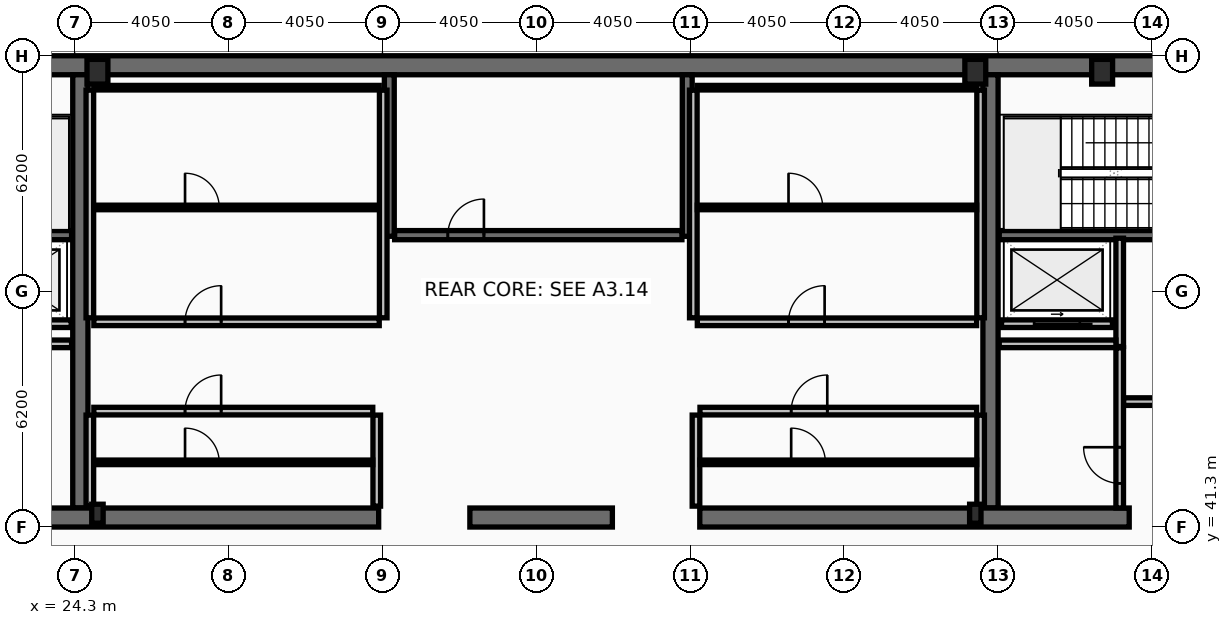
"""IFC4 building model, lengths in metres.
Left out: names, types, materials, properties, quantities, classifications, styles, units other than length and angle.
Written with IfcOpenShell. Run it as: python <this file> out.ifc"""

import sys

from ifc_helpers import new_model, si_unit, direction, frame, frame_2d, origin, origin_2d, place, context, subcontext, project, spatial, rectangle, hollow_rectangle, i_section, extrude, element, fill, save


model = new_model("IFC4")
c1 = context("Model", 3, precision=1e-05, world=origin(), true_north=direction((0.0, 1.0)))
c2 = subcontext(c1, "Body", "Model", "MODEL_VIEW")
j1 = project(units=[si_unit("LENGTHUNIT", "METRE"), si_unit("PLANEANGLEUNIT", "RADIAN")], contexts=[c1])
p1 = place(None, origin())
s1 = spatial("IfcSite", under=j1, at=p1, CompositionType="ELEMENT")
p2 = place(p1, origin())
s2 = spatial("IfcBuilding", under=s1, at=p2, CompositionType="ELEMENT")
p3 = place(p2, frame((0.0, 0.0, 373.0)))
s3 = spatial("IfcBuildingStorey", under=s2, at=p3, CompositionType="ELEMENT", Elevation=373.0)
p4 = place(p3, frame((16.2, 53.45, 0.0), z_axis=(0.0, 0.0, 1.0), x_axis=(1.0, 0.0, 0.0)))
e1 = element("IfcWall", 1, at=p4, inside=s3, PredefinedType="SHEAR", context=c2, shape_type="SweptSolid", body=[
    extrude(rectangle(XDim=40.5, YDim=0.5, at=frame_2d((20.25, 0.0))), origin(), (0.0, 0.0, 1.0), 5.4),
])
for number, where, z_axis, x_axis in (
    (2, (24.45, 41.8, 0.0), (0.0, 0.0, 1.0), (0.0, 1.0, 0.0)),
    (3, (48.4, 41.8, 0.0), (0.0, 0.0, 1.0), (0.0, 1.0, 0.0)),
):
    element("IfcWall", number, at=place(p3, frame(where, z_axis=z_axis, x_axis=x_axis)), inside=s3, PredefinedType="SHEAR", context=c2, shape_type="SweptSolid", body=[
        extrude(rectangle(XDim=11.4, YDim=0.4, at=frame_2d((5.7, 0.0))), origin(), (0.0, 0.0, 1.0), 5.4),
    ])
p5 = place(p3, frame((32.3, 41.55, 0.0), z_axis=(0.0, 0.0, 1.0), x_axis=(-1.0, 0.0, 0.0)))
e4 = element("IfcWall", 4, at=p5, inside=s3, PredefinedType="SHEAR", context=c2, shape_type="SweptSolid", body=[
    extrude(rectangle(XDim=11.45, YDim=0.5, at=frame_2d((5.725, 0.0))), origin(), (0.0, 0.0, 1.0), 5.4),
])
p6 = place(p3, frame((38.45, 41.55, 0.0), z_axis=(0.0, 0.0, 1.0), x_axis=(-1.0, 0.0, 0.0)))
e5 = element("IfcWall", 5, at=p6, inside=s3, PredefinedType="SHEAR", context=c2, shape_type="SweptSolid", body=[
    extrude(rectangle(XDim=3.75, YDim=0.5, at=frame_2d((1.875, 0.0))), origin(), (0.0, 0.0, 1.0), 5.4),
])
p7 = place(p3, frame((52.05, 41.55, 0.0), z_axis=(0.0, 0.0, 1.0), x_axis=(-1.0, 0.0, 0.0)))
e6 = element("IfcWall", 6, at=p7, inside=s3, PredefinedType="SHEAR", context=c2, shape_type="SweptSolid", body=[
    extrude(rectangle(XDim=11.3, YDim=0.5, at=frame_2d((5.65, 0.0))), origin(), (0.0, 0.0, 1.0), 5.4),
])
for number, where, z_axis, x_axis in (
    (7, (32.58, 48.95, 0.0), (0.0, 0.0, 1.0), (0.0, 1.0, 0.0)),
    (8, (40.42, 48.95, 0.0), (0.0, 0.0, 1.0), (0.0, 1.0, 0.0)),
):
    element("IfcWall", number, at=place(p3, frame(where, z_axis=z_axis, x_axis=x_axis)), inside=s3, PredefinedType="SHEAR", context=c2, shape_type="SweptSolid", body=[
        extrude(rectangle(XDim=4.25, YDim=0.26, at=frame_2d((2.125, 0.0))), origin(), (0.0, 0.0, 1.0), 5.4),
    ])
p8 = place(p3, frame((16.7, 48.98, 0.0), z_axis=(0.0, 0.0, 1.0), x_axis=(1.0, 0.0, 0.0)))
e9 = element("IfcWall", 9, at=p8, inside=s3, PredefinedType="SHEAR", context=c2, shape_type="SweptSolid", body=[
    extrude(rectangle(XDim=7.52, YDim=0.24, at=frame_2d((3.76, 0.0))), origin(), (0.0, 0.0, 1.0), 5.4),
])
p9 = place(p8, frame((0.22, 0.0, 0.0)))
e10 = element("IfcOpeningElement", 10, at=p9, cuts=e9, PredefinedType="OPENING", context=c2, shape_type="SweptSolid", body=[
    extrude(rectangle(XDim=1.05, YDim=2.15, at=frame_2d((0.525, 1.075))), frame((0.0, 0.13, 0.0), z_axis=(0.0, -1.0, 0.0), x_axis=(1.0, 0.0, 0.0)), (0.0, 0.0, 1.0), 0.26),
])
p10 = place(p3, frame((48.63, 48.98, 0.0), z_axis=(0.0, 0.0, 1.0), x_axis=(1.0, 0.0, 0.0)))
e11 = element("IfcWall", 11, at=p10, inside=s3, PredefinedType="SHEAR", context=c2, shape_type="SweptSolid", body=[
    extrude(rectangle(XDim=7.57, YDim=0.24, at=frame_2d((3.785, 0.0))), origin(), (0.0, 0.0, 1.0), 5.4),
])
p11 = place(p10, frame((6.3, 0.0, 0.0)))
e12 = element("IfcOpeningElement", 12, at=p11, cuts=e11, PredefinedType="OPENING", context=c2, shape_type="SweptSolid", body=[
    extrude(rectangle(XDim=1.05, YDim=2.15, at=frame_2d((0.525, 1.075))), frame((0.0, 0.13, 0.0), z_axis=(0.0, -1.0, 0.0), x_axis=(1.0, 0.0, 0.0)), (0.0, 0.0, 1.0), 0.26),
])
p12 = place(p3, frame((32.72, 48.98, 0.0), z_axis=(0.0, 0.0, 1.0), x_axis=(1.0, 0.0, 0.0)))
e13 = element("IfcWall", 13, at=p12, inside=s3, PredefinedType="SHEAR", context=c2, shape_type="SweptSolid", body=[
    extrude(rectangle(XDim=7.56, YDim=0.24, at=frame_2d((3.78, 0.0))), origin(), (0.0, 0.0, 1.0), 5.4),
])
p13 = place(p12, frame((1.4, 0.0, 0.0)))
e14 = element("IfcOpeningElement", 14, at=p13, cuts=e13, PredefinedType="OPENING", context=c2, shape_type="SweptSolid", body=[
    extrude(rectangle(XDim=0.95, YDim=2.1, at=frame_2d((0.475, 1.05))), frame((0.0, 0.13, 0.0), z_axis=(0.0, -1.0, 0.0), x_axis=(1.0, 0.0, 0.0)), (0.0, 0.0, 1.0), 0.26),
])
for number, where, z_axis, x_axis in (
    (15, (24.9, 53.28, 0.0), (0.0, 0.0, 1.0), (1.0, 0.0, 0.0)),
    (16, (48.0, 53.28, 0.0), (0.0, 0.0, 1.0), (1.0, 0.0, 0.0)),
    (17, (51.337, 53.28, 0.0), (0.0, 0.0, 1.0), (1.0, 0.0, 0.0)),
):
    element("IfcColumn", number, at=place(p3, frame(where, z_axis=z_axis, x_axis=x_axis)), inside=s3, PredefinedType="COLUMN", context=c2, shape_type="SweptSolid", body=[
        extrude(hollow_rectangle(XDim=0.55, YDim=0.65, WallThickness=0.04, at=origin_2d()), origin(), (0.0, 0.0, 1.0), 5.6),
    ])
for number, where, z_axis, x_axis in (
    (18, (24.9, 41.65, 0.0), (0.0, 0.0, 1.0), (1.0, 0.0, 0.0)),
    (19, (48.0, 41.65, 0.0), (0.0, 0.0, 1.0), (1.0, 0.0, 0.0)),
):
    element("IfcColumn", number, at=place(p3, frame(where, z_axis=z_axis, x_axis=x_axis)), inside=s3, PredefinedType="COLUMN", context=c2, shape_type="SweptSolid", body=[
        extrude(i_section(OverallWidth=0.3, OverallDepth=0.5, WebThickness=0.014, FlangeThickness=0.028, at=origin_2d()), origin(), (0.0, 0.0, 1.0), 5.6),
    ])
p14 = place(p3, frame((51.61, 46.65, 0.0), z_axis=(0.0, 0.0, 1.0), x_axis=(-1.0, 0.0, 0.0)))
e20 = element("IfcWall", 20, at=p14, inside=s3, PredefinedType="PARTITIONING", context=c2, shape_type="SweptSolid", body=[
    extrude(rectangle(XDim=2.92, YDim=0.2, at=frame_2d((1.46, 0.0))), origin(), (0.0, 0.0, 1.0), 5.4),
])
p15 = place(p14, frame((0.86, 0.0, 0.0)))
e21 = element("IfcOpeningElement", 21, at=p15, cuts=e20, PredefinedType="OPENING", context=c2, shape_type="SweptSolid", body=[
    extrude(rectangle(XDim=1.2, YDim=2.18, at=frame_2d((0.6, 1.09))), frame((0.0, 0.11, 0.0), z_axis=(0.0, -1.0, 0.0), x_axis=(1.0, 0.0, 0.0)), (0.0, 0.0, 1.0), 0.22),
])
p16 = place(p3, frame((24.21, 46.65, 0.0), z_axis=(0.0, 0.0, 1.0), x_axis=(-1.0, 0.0, 0.0)))
e22 = element("IfcWall", 22, at=p16, inside=s3, PredefinedType="PARTITIONING", context=c2, shape_type="SweptSolid", body=[
    extrude(rectangle(XDim=2.97, YDim=0.2, at=frame_2d((1.485, 0.0))), origin(), (0.0, 0.0, 1.0), 5.4),
])
p17 = place(p16, frame((0.91, 0.0, 0.0)))
e23 = element("IfcOpeningElement", 23, at=p17, cuts=e22, PredefinedType="OPENING", context=c2, shape_type="SweptSolid", body=[
    extrude(rectangle(XDim=1.2, YDim=2.18, at=frame_2d((0.6, 1.09))), frame((0.0, 0.11, 0.0), z_axis=(0.0, -1.0, 0.0), x_axis=(1.0, 0.0, 0.0)), (0.0, 0.0, 1.0), 0.22),
])
p18 = place(p3, frame((21.2, 46.12, 0.0), z_axis=(0.0, 0.0, 1.0), x_axis=(1.0, 0.0, 0.0)))
e24 = element("IfcWall", 24, at=p18, inside=s3, PredefinedType="PARTITIONING", context=c2, shape_type="SweptSolid", body=[
    extrude(rectangle(XDim=3.02, YDim=0.2, at=frame_2d((1.51, 0.0))), origin(), (0.0, 0.0, 1.0), 5.4),
])
p19 = place(p3, frame((51.8, 46.05, 0.0), z_axis=(0.0, 0.0, 1.0), x_axis=(0.0, 1.0, 0.0)))
e25 = element("IfcWall", 25, at=p19, inside=s3, PredefinedType="PARTITIONING", context=c2, shape_type="SweptSolid", body=[
    extrude(rectangle(XDim=2.85, YDim=0.2, at=frame_2d((1.425, 0.0))), origin(), (0.0, 0.0, 1.0), 5.4),
])
p20 = place(p3, frame((51.9, 44.6, 0.0), z_axis=(0.0, 0.0, 1.0), x_axis=(1.0, 0.0, 0.0)))
e26 = element("IfcWall", 26, at=p20, inside=s3, PredefinedType="PARTITIONING", context=c2, shape_type="SweptSolid", body=[
    extrude(rectangle(XDim=4.3, YDim=0.2, at=frame_2d((2.15, 0.0))), origin(), (0.0, 0.0, 1.0), 5.4),
])
p21 = place(p20, frame((1.15, 0.0, 0.0)))
e27 = element("IfcOpeningElement", 27, at=p21, cuts=e26, PredefinedType="OPENING", context=c2, shape_type="SweptSolid", body=[
    extrude(rectangle(XDim=1.05, YDim=2.15, at=frame_2d((0.525, 1.075))), frame((0.0, 0.11, 0.0), z_axis=(0.0, -1.0, 0.0), x_axis=(1.0, 0.0, 0.0)), (0.0, 0.0, 1.0), 0.22),
])
p22 = place(p3, frame((48.63, 46.12, 0.0), z_axis=(0.0, 0.0, 1.0), x_axis=(1.0, 0.0, 0.0)))
e28 = element("IfcWall", 28, at=p22, inside=s3, PredefinedType="PARTITIONING", context=c2, shape_type="SweptSolid", body=[
    extrude(rectangle(XDim=3.07, YDim=0.2, at=frame_2d((1.535, 0.0))), origin(), (0.0, 0.0, 1.0), 5.4),
])
p23 = place(p3, frame((51.8, 41.8, 0.0), z_axis=(0.0, 0.0, 1.0), x_axis=(0.0, 1.0, 0.0)))
e29 = element("IfcWall", 29, at=p23, inside=s3, PredefinedType="PARTITIONING", context=c2, shape_type="SweptSolid", body=[
    extrude(rectangle(XDim=4.215, YDim=0.2, at=frame_2d((2.107, 0.0))), origin(), (0.0, 0.0, 1.0), 5.4),
])
p24 = place(p23, frame((0.65, 0.0, 0.0)))
e30 = element("IfcOpeningElement", 30, at=p24, cuts=e29, PredefinedType="OPENING", context=c2, shape_type="SweptSolid", body=[
    extrude(rectangle(XDim=0.95, YDim=2.1, at=frame_2d((0.475, 1.05))), frame((0.0, 0.11, 0.0), z_axis=(0.0, -1.0, 0.0), x_axis=(1.0, 0.0, 0.0)), (0.0, 0.0, 1.0), 0.22),
])
for number, where, z_axis, x_axis in (
    (31, (24.7, 46.805, 0.0), (0.0, 0.0, 1.0), (0.0, 1.0, 0.0)),
    (32, (32.42, 46.805, 0.0), (0.0, 0.0, 1.0), (0.0, 1.0, 0.0)),
):
    element("IfcWall", number, at=place(p3, frame(where, z_axis=z_axis, x_axis=x_axis)), inside=s3, PredefinedType="PARTITIONING", context=c2, shape_type="SweptSolid", body=[
        extrude(rectangle(XDim=5.99, YDim=0.2, at=frame_2d((2.995, 0.0))), origin(), (0.0, 0.0, 1.0), 5.4),
    ])
p25 = place(p3, frame((24.805, 52.86, 0.0), z_axis=(0.0, 0.0, 1.0), x_axis=(1.0, 0.0, 0.0)))
e33 = element("IfcWall", 33, at=p25, inside=s3, PredefinedType="PARTITIONING", context=c2, shape_type="SweptSolid", body=[
    extrude(rectangle(XDim=7.51, YDim=0.12, at=frame_2d((3.755, 0.0))), origin(), (0.0, 0.0, 1.0), 5.4),
])
p26 = place(p3, frame((24.805, 49.709, 0.0), z_axis=(0.0, 0.0, 1.0), x_axis=(1.0, 0.0, 0.0)))
e34 = element("IfcWall", 34, at=p26, inside=s3, PredefinedType="PARTITIONING", context=c2, shape_type="SweptSolid", body=[
    extrude(rectangle(XDim=7.51, YDim=0.12, at=frame_2d((3.755, 0.0))), origin(), (0.0, 0.0, 1.0), 5.4),
])
p27 = place(p26, frame((2.4, 0.0, 0.0)))
e35 = element("IfcOpeningElement", 35, at=p27, cuts=e34, PredefinedType="OPENING", context=c2, shape_type="SweptSolid", body=[
    extrude(rectangle(XDim=0.9, YDim=2.05, at=frame_2d((0.45, 1.025))), frame((0.0, 0.07, 0.0), z_axis=(0.0, -1.0, 0.0), x_axis=(1.0, 0.0, 0.0)), (0.0, 0.0, 1.0), 0.14),
])
p28 = place(p3, frame((24.805, 46.7, 0.0), z_axis=(0.0, 0.0, 1.0), x_axis=(1.0, 0.0, 0.0)))
e36 = element("IfcWall", 36, at=p28, inside=s3, PredefinedType="PARTITIONING", context=c2, shape_type="SweptSolid", body=[
    extrude(rectangle(XDim=7.51, YDim=0.2, at=frame_2d((3.755, 0.0))), origin(), (0.0, 0.0, 1.0), 5.4),
])
p29 = place(p28, frame((2.4, 0.0, 0.0)))
e37 = element("IfcOpeningElement", 37, at=p29, cuts=e36, PredefinedType="OPENING", context=c2, shape_type="SweptSolid", body=[
    extrude(rectangle(XDim=0.95, YDim=2.1, at=frame_2d((0.475, 1.05))), frame((0.0, 0.11, 0.0), z_axis=(0.0, -1.0, 0.0), x_axis=(1.0, 0.0, 0.0)), (0.0, 0.0, 1.0), 0.22),
])
for number, where, z_axis, x_axis in (
    (38, (24.7, 41.85, 0.0), (0.0, 0.0, 1.0), (0.0, 1.0, 0.0)),
    (39, (32.25, 41.85, 0.0), (0.0, 0.0, 1.0), (0.0, 1.0, 0.0)),
):
    element("IfcWall", number, at=place(p3, frame(where, z_axis=z_axis, x_axis=x_axis)), inside=s3, PredefinedType="PARTITIONING", context=c2, shape_type="SweptSolid", body=[
        extrude(rectangle(XDim=2.395, YDim=0.2, at=frame_2d((1.198, 0.0))), origin(), (0.0, 0.0, 1.0), 5.4),
    ])
p30 = place(p3, frame((24.805, 43.002, 0.0), z_axis=(0.0, 0.0, 1.0), x_axis=(1.0, 0.0, 0.0)))
e40 = element("IfcWall", 40, at=p30, inside=s3, PredefinedType="PARTITIONING", context=c2, shape_type="SweptSolid", body=[
    extrude(rectangle(XDim=7.34, YDim=0.12, at=frame_2d((3.67, 0.0))), origin(), (0.0, 0.0, 1.0), 5.4),
])
p31 = place(p30, frame((2.4, 0.0, 0.0)))
e41 = element("IfcOpeningElement", 41, at=p31, cuts=e40, PredefinedType="OPENING", context=c2, shape_type="SweptSolid", body=[
    extrude(rectangle(XDim=0.9, YDim=2.05, at=frame_2d((0.45, 1.025))), frame((0.0, 0.07, 0.0), z_axis=(0.0, -1.0, 0.0), x_axis=(1.0, 0.0, 0.0)), (0.0, 0.0, 1.0), 0.14),
])
p32 = place(p3, frame((24.805, 44.35, 0.0), z_axis=(0.0, 0.0, 1.0), x_axis=(1.0, 0.0, 0.0)))
e42 = element("IfcWall", 42, at=p32, inside=s3, PredefinedType="PARTITIONING", context=c2, shape_type="SweptSolid", body=[
    extrude(rectangle(XDim=7.34, YDim=0.2, at=frame_2d((3.67, 0.0))), origin(), (0.0, 0.0, 1.0), 5.4),
])
p33 = place(p32, frame((2.4, 0.0, 0.0)))
e43 = element("IfcOpeningElement", 43, at=p33, cuts=e42, PredefinedType="OPENING", context=c2, shape_type="SweptSolid", body=[
    extrude(rectangle(XDim=0.95, YDim=2.1, at=frame_2d((0.475, 1.05))), frame((0.0, 0.11, 0.0), z_axis=(0.0, -1.0, 0.0), x_axis=(1.0, 0.0, 0.0)), (0.0, 0.0, 1.0), 0.22),
])
for number, where, z_axis, x_axis in (
    (44, (40.58, 46.805, 0.0), (0.0, 0.0, 1.0), (0.0, 1.0, 0.0)),
    (45, (48.14, 46.805, 0.0), (0.0, 0.0, 1.0), (0.0, 1.0, 0.0)),
):
    element("IfcWall", number, at=place(p3, frame(where, z_axis=z_axis, x_axis=x_axis)), inside=s3, PredefinedType="PARTITIONING", context=c2, shape_type="SweptSolid", body=[
        extrude(rectangle(XDim=5.99, YDim=0.2, at=frame_2d((2.995, 0.0))), origin(), (0.0, 0.0, 1.0), 5.4),
    ])
p34 = place(p3, frame((40.685, 52.86, 0.0), z_axis=(0.0, 0.0, 1.0), x_axis=(1.0, 0.0, 0.0)))
e46 = element("IfcWall", 46, at=p34, inside=s3, PredefinedType="PARTITIONING", context=c2, shape_type="SweptSolid", body=[
    extrude(rectangle(XDim=7.35, YDim=0.12, at=frame_2d((3.675, 0.0))), origin(), (0.0, 0.0, 1.0), 5.4),
])
p35 = place(p3, frame((40.685, 49.709, 0.0), z_axis=(0.0, 0.0, 1.0), x_axis=(1.0, 0.0, 0.0)))
e47 = element("IfcWall", 47, at=p35, inside=s3, PredefinedType="PARTITIONING", context=c2, shape_type="SweptSolid", body=[
    extrude(rectangle(XDim=7.35, YDim=0.12, at=frame_2d((3.675, 0.0))), origin(), (0.0, 0.0, 1.0), 5.4),
])
p36 = place(p35, frame((2.4, 0.0, 0.0)))
e48 = element("IfcOpeningElement", 48, at=p36, cuts=e47, PredefinedType="OPENING", context=c2, shape_type="SweptSolid", body=[
    extrude(rectangle(XDim=0.9, YDim=2.05, at=frame_2d((0.45, 1.025))), frame((0.0, 0.07, 0.0), z_axis=(0.0, -1.0, 0.0), x_axis=(1.0, 0.0, 0.0)), (0.0, 0.0, 1.0), 0.14),
])
p37 = place(p3, frame((40.685, 46.7, 0.0), z_axis=(0.0, 0.0, 1.0), x_axis=(1.0, 0.0, 0.0)))
e49 = element("IfcWall", 49, at=p37, inside=s3, PredefinedType="PARTITIONING", context=c2, shape_type="SweptSolid", body=[
    extrude(rectangle(XDim=7.35, YDim=0.2, at=frame_2d((3.675, 0.0))), origin(), (0.0, 0.0, 1.0), 5.4),
])
p38 = place(p37, frame((2.4, 0.0, 0.0)))
e50 = element("IfcOpeningElement", 50, at=p38, cuts=e49, PredefinedType="OPENING", context=c2, shape_type="SweptSolid", body=[
    extrude(rectangle(XDim=0.95, YDim=2.1, at=frame_2d((0.475, 1.05))), frame((0.0, 0.11, 0.0), z_axis=(0.0, -1.0, 0.0), x_axis=(1.0, 0.0, 0.0)), (0.0, 0.0, 1.0), 0.22),
])
for number, where, z_axis, x_axis in (
    (51, (40.65, 41.85, 0.0), (0.0, 0.0, 1.0), (0.0, 1.0, 0.0)),
    (52, (48.14, 41.85, 0.0), (0.0, 0.0, 1.0), (0.0, 1.0, 0.0)),
):
    element("IfcWall", number, at=place(p3, frame(where, z_axis=z_axis, x_axis=x_axis)), inside=s3, PredefinedType="PARTITIONING", context=c2, shape_type="SweptSolid", body=[
        extrude(rectangle(XDim=2.395, YDim=0.2, at=frame_2d((1.198, 0.0))), origin(), (0.0, 0.0, 1.0), 5.4),
    ])
p39 = place(p3, frame((40.755, 43.002, 0.0), z_axis=(0.0, 0.0, 1.0), x_axis=(1.0, 0.0, 0.0)))
e53 = element("IfcWall", 53, at=p39, inside=s3, PredefinedType="PARTITIONING", context=c2, shape_type="SweptSolid", body=[
    extrude(rectangle(XDim=7.28, YDim=0.12, at=frame_2d((3.64, 0.0))), origin(), (0.0, 0.0, 1.0), 5.4),
])
p40 = place(p39, frame((2.4, 0.0, 0.0)))
e54 = element("IfcOpeningElement", 54, at=p40, cuts=e53, PredefinedType="OPENING", context=c2, shape_type="SweptSolid", body=[
    extrude(rectangle(XDim=0.9, YDim=2.05, at=frame_2d((0.45, 1.025))), frame((0.0, 0.07, 0.0), z_axis=(0.0, -1.0, 0.0), x_axis=(1.0, 0.0, 0.0)), (0.0, 0.0, 1.0), 0.14),
])
p41 = place(p3, frame((40.755, 44.35, 0.0), z_axis=(0.0, 0.0, 1.0), x_axis=(1.0, 0.0, 0.0)))
e55 = element("IfcWall", 55, at=p41, inside=s3, PredefinedType="PARTITIONING", context=c2, shape_type="SweptSolid", body=[
    extrude(rectangle(XDim=7.28, YDim=0.2, at=frame_2d((3.64, 0.0))), origin(), (0.0, 0.0, 1.0), 5.4),
])
p42 = place(p41, frame((2.4, 0.0, 0.0)))
e56 = element("IfcOpeningElement", 56, at=p42, cuts=e55, PredefinedType="OPENING", context=c2, shape_type="SweptSolid", body=[
    extrude(rectangle(XDim=0.95, YDim=2.1, at=frame_2d((0.475, 1.05))), frame((0.0, 0.11, 0.0), z_axis=(0.0, -1.0, 0.0), x_axis=(1.0, 0.0, 0.0)), (0.0, 0.0, 1.0), 0.22),
])
p43 = place(p13, origin())
e57 = element("IfcDoor", 57, at=p43, inside=s3, OperationType="SINGLE_SWING_RIGHT", PredefinedType="DOOR", context=c2, shape_type="SweptSolid", body=[
    extrude(rectangle(XDim=0.95, YDim=2.1, at=frame_2d((0.475, 1.05))), frame((0.0, 0.025, 0.0), z_axis=(0.0, -1.0, 0.0), x_axis=(1.0, 0.0, 0.0)), (0.0, 0.0, 1.0), 0.05),
])
fill(e14, e57)
p44 = place(p15, origin())
e58 = element("IfcDoor", 58, at=p44, inside=s3, OperationType="SLIDING_TO_LEFT", PredefinedType="DOOR", context=c2, shape_type="SweptSolid", body=[
    extrude(rectangle(XDim=1.2, YDim=2.18, at=frame_2d((0.6, 1.09))), frame((0.0, 0.025, 0.0), z_axis=(0.0, -1.0, 0.0), x_axis=(1.0, 0.0, 0.0)), (0.0, 0.0, 1.0), 0.05),
])
fill(e21, e58)
p45 = place(p24, origin())
e59 = element("IfcDoor", 59, at=p45, inside=s3, OperationType="SINGLE_SWING_RIGHT", PredefinedType="DOOR", context=c2, shape_type="SweptSolid", body=[
    extrude(rectangle(XDim=0.95, YDim=2.1, at=frame_2d((0.475, 1.05))), frame((0.0, 0.025, 0.0), z_axis=(0.0, -1.0, 0.0), x_axis=(1.0, 0.0, 0.0)), (0.0, 0.0, 1.0), 0.05),
])
fill(e30, e59)
p46 = place(p27, origin())
e60 = element("IfcDoor", 60, at=p46, inside=s3, OperationType="SINGLE_SWING_LEFT", PredefinedType="DOOR", context=c2, shape_type="SweptSolid", body=[
    extrude(rectangle(XDim=0.9, YDim=2.05, at=frame_2d((0.45, 1.025))), frame((0.0, 0.025, 0.0), z_axis=(0.0, -1.0, 0.0), x_axis=(1.0, 0.0, 0.0)), (0.0, 0.0, 1.0), 0.05),
])
fill(e35, e60)
p47 = place(p29, origin())
e61 = element("IfcDoor", 61, at=p47, inside=s3, OperationType="SINGLE_SWING_RIGHT", PredefinedType="DOOR", context=c2, shape_type="SweptSolid", body=[
    extrude(rectangle(XDim=0.95, YDim=2.1, at=frame_2d((0.475, 1.05))), frame((0.0, 0.025, 0.0), z_axis=(0.0, -1.0, 0.0), x_axis=(1.0, 0.0, 0.0)), (0.0, 0.0, 1.0), 0.05),
])
fill(e37, e61)
p48 = place(p31, origin())
e62 = element("IfcDoor", 62, at=p48, inside=s3, OperationType="SINGLE_SWING_LEFT", PredefinedType="DOOR", context=c2, shape_type="SweptSolid", body=[
    extrude(rectangle(XDim=0.9, YDim=2.05, at=frame_2d((0.45, 1.025))), frame((0.0, 0.025, 0.0), z_axis=(0.0, -1.0, 0.0), x_axis=(1.0, 0.0, 0.0)), (0.0, 0.0, 1.0), 0.05),
])
fill(e41, e62)
p49 = place(p33, origin())
e63 = element("IfcDoor", 63, at=p49, inside=s3, OperationType="SINGLE_SWING_RIGHT", PredefinedType="DOOR", context=c2, shape_type="SweptSolid", body=[
    extrude(rectangle(XDim=0.95, YDim=2.1, at=frame_2d((0.475, 1.05))), frame((0.0, 0.025, 0.0), z_axis=(0.0, -1.0, 0.0), x_axis=(1.0, 0.0, 0.0)), (0.0, 0.0, 1.0), 0.05),
])
fill(e43, e63)
p50 = place(p36, origin())
e64 = element("IfcDoor", 64, at=p50, inside=s3, OperationType="SINGLE_SWING_LEFT", PredefinedType="DOOR", context=c2, shape_type="SweptSolid", body=[
    extrude(rectangle(XDim=0.9, YDim=2.05, at=frame_2d((0.45, 1.025))), frame((0.0, 0.025, 0.0), z_axis=(0.0, -1.0, 0.0), x_axis=(1.0, 0.0, 0.0)), (0.0, 0.0, 1.0), 0.05),
])
fill(e48, e64)
p51 = place(p38, origin())
e65 = element("IfcDoor", 65, at=p51, inside=s3, OperationType="SINGLE_SWING_RIGHT", PredefinedType="DOOR", context=c2, shape_type="SweptSolid", body=[
    extrude(rectangle(XDim=0.95, YDim=2.1, at=frame_2d((0.475, 1.05))), frame((0.0, 0.025, 0.0), z_axis=(0.0, -1.0, 0.0), x_axis=(1.0, 0.0, 0.0)), (0.0, 0.0, 1.0), 0.05),
])
fill(e50, e65)
p52 = place(p40, origin())
e66 = element("IfcDoor", 66, at=p52, inside=s3, OperationType="SINGLE_SWING_LEFT", PredefinedType="DOOR", context=c2, shape_type="SweptSolid", body=[
    extrude(rectangle(XDim=0.9, YDim=2.05, at=frame_2d((0.45, 1.025))), frame((0.0, 0.025, 0.0), z_axis=(0.0, -1.0, 0.0), x_axis=(1.0, 0.0, 0.0)), (0.0, 0.0, 1.0), 0.05),
])
fill(e54, e66)
p53 = place(p42, origin())
e67 = element("IfcDoor", 67, at=p53, inside=s3, OperationType="SINGLE_SWING_RIGHT", PredefinedType="DOOR", context=c2, shape_type="SweptSolid", body=[
    extrude(rectangle(XDim=0.95, YDim=2.1, at=frame_2d((0.475, 1.05))), frame((0.0, 0.025, 0.0), z_axis=(0.0, -1.0, 0.0), x_axis=(1.0, 0.0, 0.0)), (0.0, 0.0, 1.0), 0.05),
])
fill(e56, e67)
save(model, sys.argv[1])
